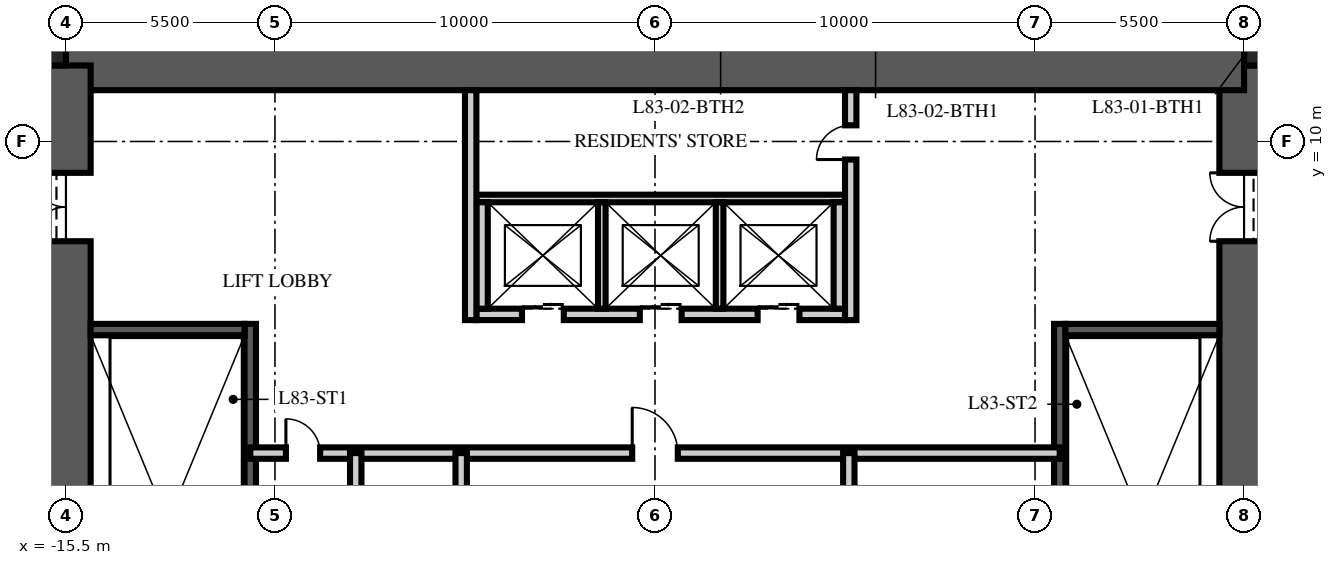
"""IFC4 building model, lengths in metres.
Left out: names, types, materials, properties, quantities, classifications, styles, units other than length and angle.
Written with IfcOpenShell. Run it as: python <this file> out.ifc"""

import sys

from ifc_helpers import new_model, si_unit, direction, frame, frame_2d, origin, origin_2d, place, context, subcontext, project, spatial, rectangle, extrude, element, fill, save


model = new_model("IFC4")
c1 = context("Model", 3, precision=1e-05, world=origin(), true_north=direction((0.0, 1.0)))
c2 = subcontext(c1, "Body", "Model", "MODEL_VIEW")
j1 = project(units=[si_unit("LENGTHUNIT", "METRE"), si_unit("PLANEANGLEUNIT", "RADIAN")], contexts=[c1])
p1 = place(None, origin())
s1 = spatial("IfcSite", under=j1, at=p1, CompositionType="ELEMENT")
p2 = place(p1, origin())
s2 = spatial("IfcBuilding", under=s1, at=p2, CompositionType="ELEMENT")
p3 = place(p2, frame((0.0, 0.0, 330.75)))
s3 = spatial("IfcBuildingStorey", under=s2, at=p3, CompositionType="ELEMENT", Elevation=330.75)
p4 = place(p3, frame((15.5, -12.0, -0.25), z_axis=(0.0, 0.0, 1.0), x_axis=(0.0, 1.0, 0.0)))
e1 = element("IfcWall", 1, at=p4, inside=s3, PredefinedType="SHEAR", context=c2, shape_type="SweptSolid", body=[
    extrude(rectangle(XDim=24.0, YDim=1.3, at=frame_2d((12.0, 0.0))), origin(), (0.0, 0.0, 1.0), 3.75),
])
p5 = place(p4, frame((3.125, 0.0, 0.25)))
e2 = element("IfcOpeningElement", 2, at=p5, cuts=e1, PredefinedType="OPENING", context=c2, shape_type="SweptSolid", body=[
    extrude(rectangle(XDim=1.2, YDim=2.1, at=frame_2d((0.6, 1.05))), frame((0.0, 0.66, 0.0), z_axis=(0.0, -1.0, 0.0), x_axis=(1.0, 0.0, 0.0)), (0.0, 0.0, 1.0), 1.32),
])
p6 = place(p4, frame((19.375, 0.0, 0.25)))
e3 = element("IfcOpeningElement", 3, at=p6, cuts=e1, PredefinedType="OPENING", context=c2, shape_type="SweptSolid", body=[
    extrude(rectangle(XDim=1.8, YDim=2.1, at=frame_2d((0.9, 1.05))), frame((0.0, 0.66, 0.0), z_axis=(0.0, -1.0, 0.0), x_axis=(1.0, 0.0, 0.0)), (0.0, 0.0, 1.0), 1.32),
])
p7 = place(p3, frame((-15.5, 12.0, -0.25), z_axis=(0.0, 0.0, 1.0), x_axis=(1.0, 0.0, 0.0)))
e4 = element("IfcWall", 4, at=p7, inside=s3, PredefinedType="SHEAR", context=c2, shape_type="SweptSolid", body=[
    extrude(rectangle(XDim=31.0, YDim=1.3, at=frame_2d((15.5, 0.0))), origin(), (0.0, 0.0, 1.0), 3.75),
])
p8 = place(p3, frame((-15.5, -12.0, -0.25), z_axis=(0.0, 0.0, 1.0), x_axis=(0.0, 1.0, 0.0)))
e5 = element("IfcWall", 5, at=p8, inside=s3, PredefinedType="SHEAR", context=c2, shape_type="SweptSolid", body=[
    extrude(rectangle(XDim=24.0, YDim=1.3, at=frame_2d((12.0, 0.0))), origin(), (0.0, 0.0, 1.0), 3.75),
])
p9 = place(p8, frame((3.125, 0.0, 0.25)))
e6 = element("IfcOpeningElement", 6, at=p9, cuts=e5, PredefinedType="OPENING", context=c2, shape_type="SweptSolid", body=[
    extrude(rectangle(XDim=1.2, YDim=2.1, at=frame_2d((0.6, 1.05))), frame((0.0, 0.66, 0.0), z_axis=(0.0, -1.0, 0.0), x_axis=(1.0, 0.0, 0.0)), (0.0, 0.0, 1.0), 1.32),
])
p10 = place(p8, frame((19.375, 0.0, 0.25)))
e7 = element("IfcOpeningElement", 7, at=p10, cuts=e5, PredefinedType="OPENING", context=c2, shape_type="SweptSolid", body=[
    extrude(rectangle(XDim=1.8, YDim=2.1, at=frame_2d((0.9, 1.05))), frame((0.0, 0.66, 0.0), z_axis=(0.0, -1.0, 0.0), x_axis=(1.0, 0.0, 0.0)), (0.0, 0.0, 1.0), 1.32),
])
for number, where, z_axis, x_axis in (
    (8, (15.825, 12.325, -0.25), (0.0, 0.0, 1.0), (1.0, 0.0, 0.0)),
    (9, (-15.825, 12.325, -0.25), (0.0, 0.0, 1.0), (1.0, 0.0, 0.0)),
):
    element("IfcColumn", number, at=place(p3, frame(where, z_axis=z_axis, x_axis=x_axis)), inside=s3, PredefinedType="COLUMN", context=c2, shape_type="SweptSolid", body=[
        extrude(rectangle(XDim=0.65, YDim=0.65, at=origin_2d()), origin(), (0.0, 0.0, 1.0), 3.75),
    ])
p11 = place(p3, frame((-10.65, -4.9, 0.0), z_axis=(0.0, 0.0, 1.0), x_axis=(0.0, 1.0, 0.0)))
e10 = element("IfcWall", 10, at=p11, inside=s3, PredefinedType="SOLIDWALL", context=c2, shape_type="SweptSolid", body=[
    extrude(rectangle(XDim=10.1, YDim=0.3, at=frame_2d((5.05, 0.0))), origin(), (0.0, 0.0, 1.0), 3.5),
])
p12 = place(p3, frame((-14.85, 5.05, 0.0), z_axis=(0.0, 0.0, 1.0), x_axis=(1.0, 0.0, 0.0)))
e11 = element("IfcWall", 11, at=p12, inside=s3, PredefinedType="SOLIDWALL", context=c2, shape_type="SweptSolid", body=[
    extrude(rectangle(XDim=4.05, YDim=0.3, at=frame_2d((2.025, 0.0))), origin(), (0.0, 0.0, 1.0), 3.5),
])
p13 = place(p3, frame((10.65, -4.9, 0.0), z_axis=(0.0, 0.0, 1.0), x_axis=(0.0, 1.0, 0.0)))
e12 = element("IfcWall", 12, at=p13, inside=s3, PredefinedType="SOLIDWALL", context=c2, shape_type="SweptSolid", body=[
    extrude(rectangle(XDim=10.1, YDim=0.3, at=frame_2d((5.05, 0.0))), origin(), (0.0, 0.0, 1.0), 3.5),
])
p14 = place(p3, frame((14.85, 5.05, 0.0), z_axis=(0.0, 0.0, 1.0), x_axis=(-1.0, 0.0, 0.0)))
e13 = element("IfcWall", 13, at=p14, inside=s3, PredefinedType="SOLIDWALL", context=c2, shape_type="SweptSolid", body=[
    extrude(rectangle(XDim=4.05, YDim=0.3, at=frame_2d((2.025, 0.0))), origin(), (0.0, 0.0, 1.0), 3.5),
])
p15 = place(p3, frame((-4.7, 5.45, 0.0), z_axis=(0.0, 0.0, 1.0), x_axis=(1.0, 0.0, 0.0)))
e14 = element("IfcWall", 14, at=p15, inside=s3, PredefinedType="PARTITIONING", context=c2, shape_type="SweptSolid", body=[
    extrude(rectangle(XDim=9.7, YDim=0.3, at=frame_2d((4.85, 0.0))), origin(), (0.0, 0.0, 1.0), 3.5),
])
p16 = place(p15, frame((1.2, 0.0, 0.0)))
e15 = element("IfcOpeningElement", 15, at=p16, cuts=e14, PredefinedType="OPENING", context=c2, shape_type="SweptSolid", body=[
    extrude(rectangle(XDim=1.1, YDim=2.1, at=frame_2d((0.55, 1.05))), frame((0.0, 0.16, 0.0), z_axis=(0.0, -1.0, 0.0), x_axis=(1.0, 0.0, 0.0)), (0.0, 0.0, 1.0), 0.32),
])
p17 = place(p15, frame((4.3, 0.0, 0.0)))
e16 = element("IfcOpeningElement", 16, at=p17, cuts=e14, PredefinedType="OPENING", context=c2, shape_type="SweptSolid", body=[
    extrude(rectangle(XDim=1.1, YDim=2.1, at=frame_2d((0.55, 1.05))), frame((0.0, 0.16, 0.0), z_axis=(0.0, -1.0, 0.0), x_axis=(1.0, 0.0, 0.0)), (0.0, 0.0, 1.0), 0.32),
])
p18 = place(p15, frame((7.4, 0.0, 0.0)))
e17 = element("IfcOpeningElement", 17, at=p18, cuts=e14, PredefinedType="OPENING", context=c2, shape_type="SweptSolid", body=[
    extrude(rectangle(XDim=1.1, YDim=2.1, at=frame_2d((0.55, 1.05))), frame((0.0, 0.16, 0.0), z_axis=(0.0, -1.0, 0.0), x_axis=(1.0, 0.0, 0.0)), (0.0, 0.0, 1.0), 0.32),
])
p19 = place(p3, frame((-4.7, 8.5, 0.0), z_axis=(0.0, 0.0, 1.0), x_axis=(1.0, 0.0, 0.0)))
e18 = element("IfcWall", 18, at=p19, inside=s3, PredefinedType="PARTITIONING", context=c2, shape_type="SweptSolid", body=[
    extrude(rectangle(XDim=9.7, YDim=0.2, at=frame_2d((4.85, 0.0))), origin(), (0.0, 0.0, 1.0), 3.5),
])
for number, where, z_axis, x_axis in (
    (19, (-4.55, 5.6, 0.0), (0.0, 0.0, 1.0), (0.0, 1.0, 0.0)),
    (20, (4.85, 5.6, 0.0), (0.0, 0.0, 1.0), (0.0, 1.0, 0.0)),
):
    element("IfcWall", number, at=place(p3, frame(where, z_axis=z_axis, x_axis=x_axis)), inside=s3, PredefinedType="PARTITIONING", context=c2, shape_type="SweptSolid", body=[
        extrude(rectangle(XDim=2.8, YDim=0.3, at=frame_2d((1.4, 0.0))), origin(), (0.0, 0.0, 1.0), 3.5),
    ])
for number, where, z_axis, x_axis in (
    (21, (-1.4, 5.6, 0.0), (0.0, 0.0, 1.0), (0.0, 1.0, 0.0)),
    (22, (1.7, 5.6, 0.0), (0.0, 0.0, 1.0), (0.0, 1.0, 0.0)),
):
    element("IfcWall", number, at=place(p3, frame(where, z_axis=z_axis, x_axis=x_axis)), inside=s3, PredefinedType="PARTITIONING", context=c2, shape_type="SweptSolid", body=[
        extrude(rectangle(XDim=2.8, YDim=0.2, at=frame_2d((1.4, 0.0))), origin(), (0.0, 0.0, 1.0), 3.5),
    ])
p20 = place(p3, frame((-10.65, 1.8, 0.0), z_axis=(0.0, 0.0, 1.0), x_axis=(1.0, 0.0, 0.0)))
e23 = element("IfcWall", 23, at=p20, inside=s3, PredefinedType="PARTITIONING", context=c2, shape_type="SweptSolid", body=[
    extrude(rectangle(XDim=21.3, YDim=0.3, at=frame_2d((10.65, 0.0))), origin(), (0.0, 0.0, 1.0), 3.5),
])
p21 = place(p20, frame((10.05, 0.0, 0.0)))
e24 = element("IfcOpeningElement", 24, at=p21, cuts=e23, PredefinedType="OPENING", context=c2, shape_type="SweptSolid", body=[
    extrude(rectangle(XDim=1.2, YDim=2.1, at=frame_2d((0.6, 1.05))), frame((0.0, 0.16, 0.0), z_axis=(0.0, -1.0, 0.0), x_axis=(1.0, 0.0, 0.0)), (0.0, 0.0, 1.0), 0.32),
])
p22 = place(p20, frame((0.938, 0.0, 0.0)))
e25 = element("IfcOpeningElement", 25, at=p22, cuts=e23, PredefinedType="OPENING", context=c2, shape_type="SweptSolid", body=[
    extrude(rectangle(XDim=0.9, YDim=2.1, at=frame_2d((0.45, 1.05))), frame((0.0, 0.16, 0.0), z_axis=(0.0, -1.0, 0.0), x_axis=(1.0, 0.0, 0.0)), (0.0, 0.0, 1.0), 0.32),
])
p23 = place(p3, frame((-5.1, -6.65, 0.0), z_axis=(0.0, 0.0, 1.0), x_axis=(0.0, 1.0, 0.0)))
e26 = element("IfcWall", 26, at=p23, inside=s3, PredefinedType="PARTITIONING", context=c2, shape_type="SweptSolid", body=[
    extrude(rectangle(XDim=8.45, YDim=0.3, at=frame_2d((4.225, 0.0))), origin(), (0.0, 0.0, 1.0), 3.5),
])
p24 = place(p23, frame((1.7, 0.0, 0.0)))
e27 = element("IfcOpeningElement", 27, at=p24, cuts=e26, PredefinedType="OPENING", context=c2, shape_type="SweptSolid", body=[
    extrude(rectangle(XDim=0.9, YDim=2.1, at=frame_2d((0.45, 1.05))), frame((0.0, 0.16, 0.0), z_axis=(0.0, -1.0, 0.0), x_axis=(1.0, 0.0, 0.0)), (0.0, 0.0, 1.0), 0.32),
])
p25 = place(p23, frame((5.925, 0.0, 0.0)))
e28 = element("IfcOpeningElement", 28, at=p25, cuts=e26, PredefinedType="OPENING", context=c2, shape_type="SweptSolid", body=[
    extrude(rectangle(XDim=0.9, YDim=2.1, at=frame_2d((0.45, 1.05))), frame((0.0, 0.16, 0.0), z_axis=(0.0, -1.0, 0.0), x_axis=(1.0, 0.0, 0.0)), (0.0, 0.0, 1.0), 0.32),
])
p26 = place(p3, frame((5.1, -6.65, 0.0), z_axis=(0.0, 0.0, 1.0), x_axis=(0.0, 1.0, 0.0)))
e29 = element("IfcWall", 29, at=p26, inside=s3, PredefinedType="PARTITIONING", context=c2, shape_type="SweptSolid", body=[
    extrude(rectangle(XDim=8.45, YDim=0.3, at=frame_2d((4.225, 0.0))), origin(), (0.0, 0.0, 1.0), 3.5),
])
p27 = place(p26, frame((1.866, 0.0, 0.0)))
e30 = element("IfcOpeningElement", 30, at=p27, cuts=e29, PredefinedType="OPENING", context=c2, shape_type="SweptSolid", body=[
    extrude(rectangle(XDim=0.9, YDim=2.1, at=frame_2d((0.45, 1.05))), frame((0.0, 0.16, 0.0), z_axis=(0.0, -1.0, 0.0), x_axis=(1.0, 0.0, 0.0)), (0.0, 0.0, 1.0), 0.32),
])
p28 = place(p26, frame((6.091, 0.0, 0.0)))
e31 = element("IfcOpeningElement", 31, at=p28, cuts=e29, PredefinedType="OPENING", context=c2, shape_type="SweptSolid", body=[
    extrude(rectangle(XDim=0.9, YDim=2.1, at=frame_2d((0.45, 1.05))), frame((0.0, 0.16, 0.0), z_axis=(0.0, -1.0, 0.0), x_axis=(1.0, 0.0, 0.0)), (0.0, 0.0, 1.0), 0.32),
])
p29 = place(p3, frame((-7.875, -2.35, 0.0), z_axis=(0.0, 0.0, 1.0), x_axis=(0.0, 1.0, 0.0)))
e32 = element("IfcWall", 32, at=p29, inside=s3, PredefinedType="PARTITIONING", context=c2, shape_type="SweptSolid", body=[
    extrude(rectangle(XDim=4.15, YDim=0.3, at=frame_2d((2.075, 0.0))), origin(), (0.0, 0.0, 1.0), 3.5),
])
p30 = place(p3, frame((-4.85, 5.3, 0.0), z_axis=(0.0, 0.0, 1.0), x_axis=(0.0, 1.0, 0.0)))
e33 = element("IfcWall", 33, at=p30, inside=s3, PredefinedType="PARTITIONING", context=c2, shape_type="SweptSolid", body=[
    extrude(rectangle(XDim=6.05, YDim=0.3, at=frame_2d((3.025, 0.0))), origin(), (0.0, 0.0, 1.0), 3.5),
])
p31 = place(p3, frame((5.15, 5.3, 0.0), z_axis=(0.0, 0.0, 1.0), x_axis=(0.0, 1.0, 0.0)))
e34 = element("IfcWall", 34, at=p31, inside=s3, PredefinedType="PARTITIONING", context=c2, shape_type="SweptSolid", body=[
    extrude(rectangle(XDim=6.05, YDim=0.3, at=frame_2d((3.025, 0.0))), origin(), (0.0, 0.0, 1.0), 3.5),
])
p32 = place(p31, frame((4.225, 0.0, 0.0)))
e35 = element("IfcOpeningElement", 35, at=p32, cuts=e34, PredefinedType="OPENING", context=c2, shape_type="SweptSolid", body=[
    extrude(rectangle(XDim=0.9, YDim=2.1, at=frame_2d((0.45, 1.05))), frame((0.0, 0.16, 0.0), z_axis=(0.0, -1.0, 0.0), x_axis=(1.0, 0.0, 0.0)), (0.0, 0.0, 1.0), 0.32),
])
p33 = place(p10, origin())
e36 = element("IfcDoor", 36, at=p33, inside=s3, OperationType="DOUBLE_DOOR_SINGLE_SWING", PredefinedType="DOOR", context=c2, shape_type="SweptSolid", body=[
    extrude(rectangle(XDim=1.8, YDim=2.1, at=frame_2d((0.9, 1.05))), frame((0.0, 0.025, 0.0), z_axis=(0.0, -1.0, 0.0), x_axis=(1.0, 0.0, 0.0)), (0.0, 0.0, 1.0), 0.05),
])
fill(e7, e36)
p34 = place(p6, origin())
e37 = element("IfcDoor", 37, at=p34, inside=s3, OperationType="DOUBLE_DOOR_SINGLE_SWING", PredefinedType="DOOR", context=c2, shape_type="SweptSolid", body=[
    extrude(rectangle(XDim=1.8, YDim=2.1, at=frame_2d((0.9, 1.05))), frame((0.0, 0.025, 0.0), z_axis=(0.0, -1.0, 0.0), x_axis=(1.0, 0.0, 0.0)), (0.0, 0.0, 1.0), 0.05),
])
fill(e3, e37)
p35 = place(p16, origin())
e38 = element("IfcDoor", 38, at=p35, inside=s3, OperationType="DOUBLE_DOOR_SLIDING", PredefinedType="DOOR", context=c2, shape_type="SweptSolid", body=[
    extrude(rectangle(XDim=1.1, YDim=2.1, at=frame_2d((0.55, 1.05))), frame((0.0, 0.025, 0.0), z_axis=(0.0, -1.0, 0.0), x_axis=(1.0, 0.0, 0.0)), (0.0, 0.0, 1.0), 0.05),
])
fill(e15, e38)
p36 = place(p17, origin())
e39 = element("IfcDoor", 39, at=p36, inside=s3, OperationType="DOUBLE_DOOR_SLIDING", PredefinedType="DOOR", context=c2, shape_type="SweptSolid", body=[
    extrude(rectangle(XDim=1.1, YDim=2.1, at=frame_2d((0.55, 1.05))), frame((0.0, 0.025, 0.0), z_axis=(0.0, -1.0, 0.0), x_axis=(1.0, 0.0, 0.0)), (0.0, 0.0, 1.0), 0.05),
])
fill(e16, e39)
p37 = place(p18, origin())
e40 = element("IfcDoor", 40, at=p37, inside=s3, OperationType="DOUBLE_DOOR_SLIDING", PredefinedType="DOOR", context=c2, shape_type="SweptSolid", body=[
    extrude(rectangle(XDim=1.1, YDim=2.1, at=frame_2d((0.55, 1.05))), frame((0.0, 0.025, 0.0), z_axis=(0.0, -1.0, 0.0), x_axis=(1.0, 0.0, 0.0)), (0.0, 0.0, 1.0), 0.05),
])
fill(e17, e40)
p38 = place(p21, origin())
e41 = element("IfcDoor", 41, at=p38, inside=s3, OperationType="SINGLE_SWING_LEFT", PredefinedType="DOOR", context=c2, shape_type="SweptSolid", body=[
    extrude(rectangle(XDim=1.2, YDim=2.1, at=frame_2d((0.6, 1.05))), frame((0.0, 0.025, 0.0), z_axis=(0.0, -1.0, 0.0), x_axis=(1.0, 0.0, 0.0)), (0.0, 0.0, 1.0), 0.05),
])
fill(e24, e41)
p39 = place(p22, origin())
e42 = element("IfcDoor", 42, at=p39, inside=s3, OperationType="SINGLE_SWING_LEFT", PredefinedType="DOOR", context=c2, shape_type="SweptSolid", body=[
    extrude(rectangle(XDim=0.9, YDim=2.1, at=frame_2d((0.45, 1.05))), frame((0.0, 0.025, 0.0), z_axis=(0.0, -1.0, 0.0), x_axis=(1.0, 0.0, 0.0)), (0.0, 0.0, 1.0), 0.05),
])
fill(e25, e42)
p40 = place(p32, origin())
e43 = element("IfcDoor", 43, at=p40, inside=s3, OperationType="SINGLE_SWING_LEFT", PredefinedType="DOOR", context=c2, shape_type="SweptSolid", body=[
    extrude(rectangle(XDim=0.9, YDim=2.1, at=frame_2d((0.45, 1.05))), frame((0.0, 0.025, 0.0), z_axis=(0.0, -1.0, 0.0), x_axis=(1.0, 0.0, 0.0)), (0.0, 0.0, 1.0), 0.05),
])
fill(e35, e43)
save(model, sys.argv[1])
